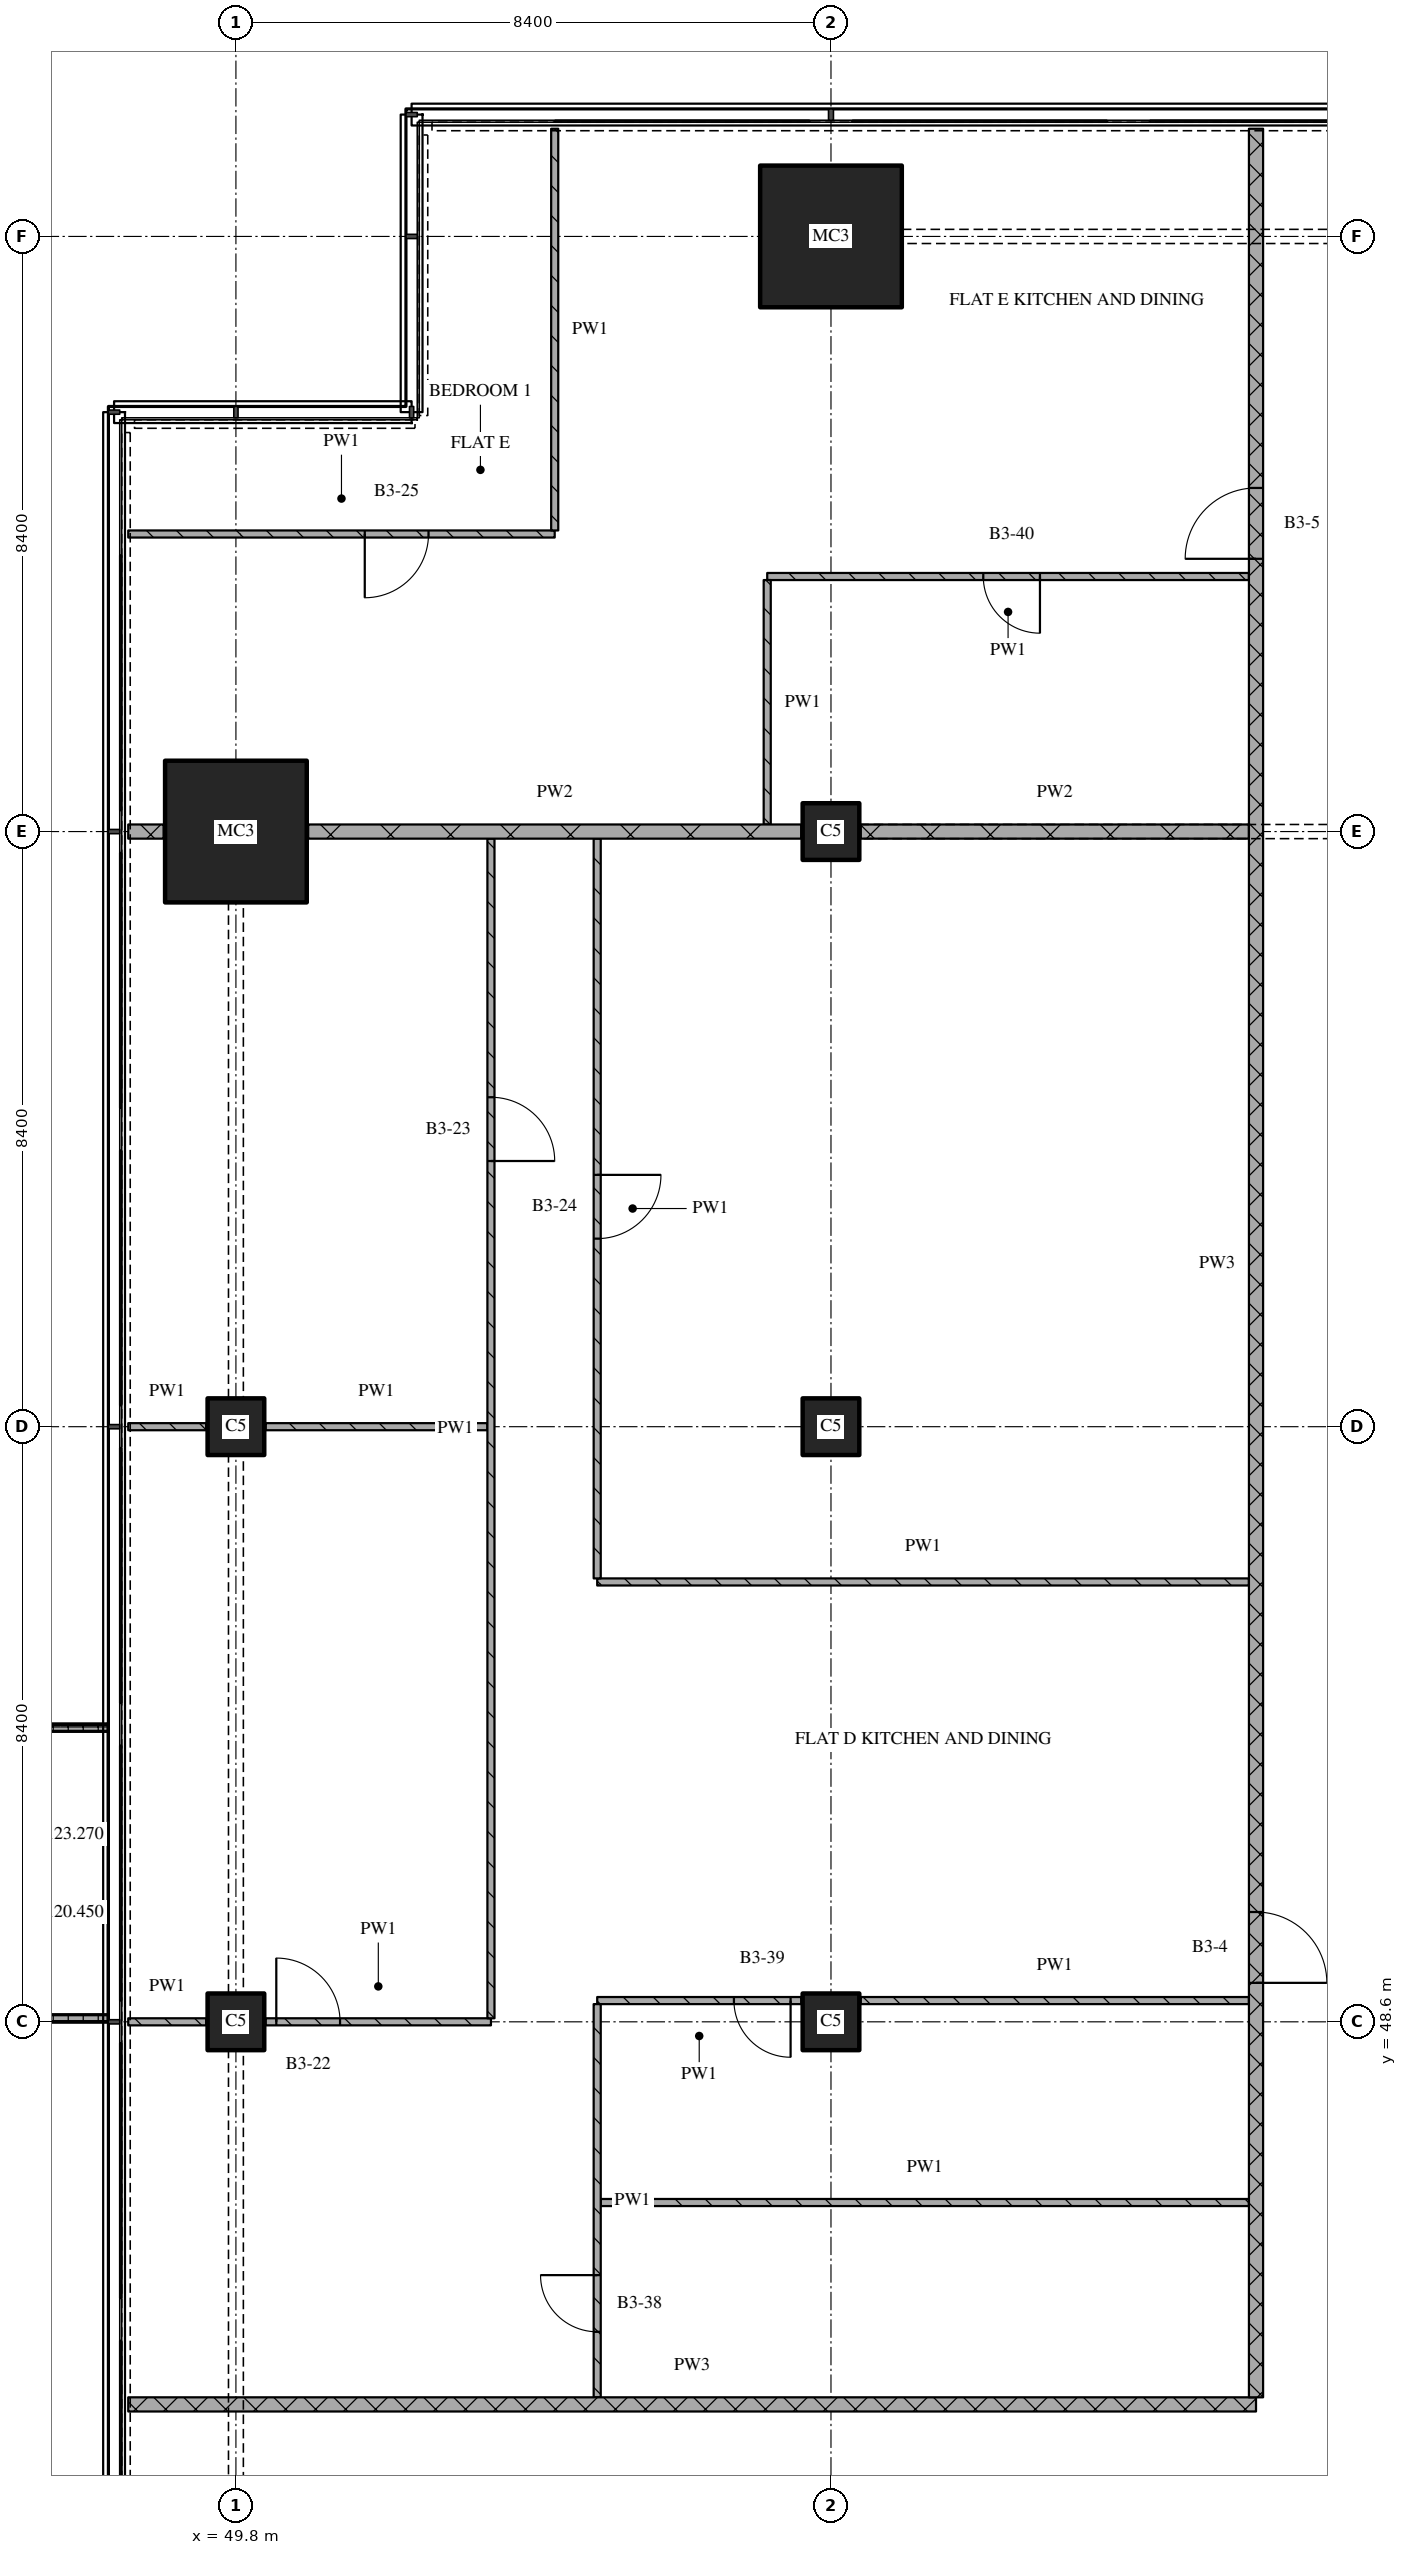
"""IFC4 building model, lengths in metres.
Left out: names, types, materials, properties, quantities, classifications, styles, units other than length and angle.
Written with IfcOpenShell. Run it as: python <this file> out.ifc"""

import sys

from ifc_helpers import new_model, si_unit, direction, frame, frame_2d, origin, origin_2d, place, context, subcontext, project, spatial, polyline, rectangle, outline, extrude, element, fill, save


model = new_model("IFC4")
c1 = context("Model", 3, precision=1e-05, world=origin(), true_north=direction((0.0, 1.0)))
c2 = subcontext(c1, "Body", "Model", "MODEL_VIEW")
j1 = project(units=[si_unit("LENGTHUNIT", "METRE"), si_unit("PLANEANGLEUNIT", "RADIAN")], contexts=[c1])
p1 = place(None, origin())
s1 = spatial("IfcSite", under=j1, at=p1, CompositionType="ELEMENT")
p2 = place(p1, origin())
s2 = spatial("IfcBuilding", under=s1, at=p2, CompositionType="ELEMENT")
p3 = place(p2, frame((0.0, 0.0, 120.45)))
s3 = spatial("IfcBuildingStorey", under=s2, at=p3, CompositionType="ELEMENT", Elevation=120.45)
for number, where, z_axis, x_axis in (
    (1, (49.8, 48.6, 0.0), (0.0, 0.0, 1.0), (1.0, 0.0, 0.0)),
    (2, (49.8, 57.0, 0.0), (0.0, 0.0, 1.0), (1.0, 0.0, 0.0)),
):
    element("IfcColumn", number, at=place(p3, frame(where, z_axis=z_axis, x_axis=x_axis)), inside=s3, PredefinedType="COLUMN", context=c2, shape_type="SweptSolid", body=[
        extrude(rectangle(XDim=0.8, YDim=0.8, at=origin_2d()), origin(), (0.0, 0.0, 1.0), 3.6),
    ])
p4 = place(p3, frame((49.8, 65.4, 0.0), z_axis=(0.0, 0.0, 1.0), x_axis=(1.0, 0.0, 0.0)))
e3 = element("IfcColumn", 3, at=p4, inside=s3, PredefinedType="COLUMN", context=c2, shape_type="SweptSolid", body=[
    extrude(rectangle(XDim=2.0, YDim=2.0, at=origin_2d()), origin(), (0.0, 0.0, 1.0), 3.6),
])
for number, where, z_axis, x_axis in (
    (4, (58.2, 48.6, 0.0), (0.0, 0.0, 1.0), (1.0, 0.0, 0.0)),
    (5, (58.2, 57.0, 0.0), (0.0, 0.0, 1.0), (1.0, 0.0, 0.0)),
    (6, (58.2, 65.4, 0.0), (0.0, 0.0, 1.0), (1.0, 0.0, 0.0)),
):
    element("IfcColumn", number, at=place(p3, frame(where, z_axis=z_axis, x_axis=x_axis)), inside=s3, PredefinedType="COLUMN", context=c2, shape_type="SweptSolid", body=[
        extrude(rectangle(XDim=0.8, YDim=0.8, at=origin_2d()), origin(), (0.0, 0.0, 1.0), 3.6),
    ])
p5 = place(p3, frame((58.2, 73.8, 0.0), z_axis=(0.0, 0.0, 1.0), x_axis=(1.0, 0.0, 0.0)))
e7 = element("IfcColumn", 7, at=p5, inside=s3, PredefinedType="COLUMN", context=c2, shape_type="SweptSolid", body=[
    extrude(rectangle(XDim=2.0, YDim=2.0, at=origin_2d()), origin(), (0.0, 0.0, 1.0), 3.6),
])
p6 = place(p3, origin())
e8 = element("IfcWall", 8, at=p6, inside=s3, PredefinedType="SOLIDWALL", context=c2, shape_type="SweptSolid", body=[
    extrude(outline(polyline([(48.0, 52.8), (48.0, 52.7), (46.367, 52.7), (46.367, 48.7), (48.0, 48.7), (48.0, 48.6), (46.267, 48.6), (46.267, 52.8), (48.0, 52.8)])), origin(), (0.0, 0.0, 1.0), 1.0),
])
p7 = place(p3, frame((48.28, 43.2, 0.0), z_axis=(0.0, 0.0, 1.0), x_axis=(1.0, 0.0, 0.0)))
e9 = element("IfcWall", 9, at=p7, inside=s3, PredefinedType="PARTITIONING", context=c2, shape_type="SweptSolid", body=[
    extrude(rectangle(XDim=15.92, YDim=0.2, at=frame_2d((7.96, 0.0))), origin(), (0.0, 0.0, 1.0), 3.32),
])
p8 = place(p3, frame((54.95, 46.05, 0.0), z_axis=(0.0, 0.0, 1.0), x_axis=(1.0, 0.0, 0.0)))
e10 = element("IfcWall", 10, at=p8, inside=s3, PredefinedType="PARTITIONING", context=c2, shape_type="SweptSolid", body=[
    extrude(rectangle(XDim=9.15, YDim=0.1, at=frame_2d((4.575, 0.0))), origin(), (0.0, 0.0, 1.0), 3.32),
])
p9 = place(p3, frame((48.28, 48.6, 0.0), z_axis=(0.0, 0.0, 1.0), x_axis=(1.0, 0.0, 0.0)))
e11 = element("IfcWall", 11, at=p9, inside=s3, PredefinedType="PARTITIONING", context=c2, shape_type="SweptSolid", body=[
    extrude(rectangle(XDim=1.1, YDim=0.1, at=frame_2d((0.55, 0.0))), origin(), (0.0, 0.0, 1.0), 3.32),
])
p10 = place(p3, frame((50.22, 48.6, 0.0), z_axis=(0.0, 0.0, 1.0), x_axis=(1.0, 0.0, 0.0)))
e12 = element("IfcWall", 12, at=p10, inside=s3, PredefinedType="PARTITIONING", context=c2, shape_type="SweptSolid", body=[
    extrude(rectangle(XDim=3.18, YDim=0.1, at=frame_2d((1.59, 0.0))), origin(), (0.0, 0.0, 1.0), 3.32),
])
p11 = place(p10, frame((0.15, 0.0, 0.0)))
e13 = element("IfcOpeningElement", 13, at=p11, cuts=e12, PredefinedType="OPENING", context=c2, shape_type="SweptSolid", body=[
    extrude(rectangle(XDim=0.9, YDim=2.1, at=frame_2d((0.45, 1.05))), frame((0.0, 0.06, 0.0), z_axis=(0.0, -1.0, 0.0), x_axis=(1.0, 0.0, 0.0)), (0.0, 0.0, 1.0), 0.12),
])
p12 = place(p3, frame((57.78, 48.9, 0.0), z_axis=(0.0, 0.0, 1.0), x_axis=(-1.0, 0.0, 0.0)))
e14 = element("IfcWall", 14, at=p12, inside=s3, PredefinedType="PARTITIONING", context=c2, shape_type="SweptSolid", body=[
    extrude(rectangle(XDim=2.88, YDim=0.1, at=frame_2d((1.44, 0.0))), origin(), (0.0, 0.0, 1.0), 3.32),
])
p13 = place(p12, frame((0.15, 0.0, 0.0)))
e15 = element("IfcOpeningElement", 15, at=p13, cuts=e14, PredefinedType="OPENING", context=c2, shape_type="SweptSolid", body=[
    extrude(rectangle(XDim=0.8, YDim=2.1, at=frame_2d((0.4, 1.05))), frame((0.0, 0.06, 0.0), z_axis=(0.0, -1.0, 0.0), x_axis=(1.0, 0.0, 0.0)), (0.0, 0.0, 1.0), 0.12),
])
p14 = place(p3, frame((58.62, 48.9, 0.0), z_axis=(0.0, 0.0, 1.0), x_axis=(1.0, 0.0, 0.0)))
e16 = element("IfcWall", 16, at=p14, inside=s3, PredefinedType="PARTITIONING", context=c2, shape_type="SweptSolid", body=[
    extrude(rectangle(XDim=5.48, YDim=0.1, at=frame_2d((2.74, 0.0))), origin(), (0.0, 0.0, 1.0), 3.32),
])
p15 = place(p3, frame((54.9, 54.809, 0.0), z_axis=(0.0, 0.0, 1.0), x_axis=(1.0, 0.0, 0.0)))
e17 = element("IfcWall", 17, at=p15, inside=s3, PredefinedType="PARTITIONING", context=c2, shape_type="SweptSolid", body=[
    extrude(rectangle(XDim=9.2, YDim=0.1, at=frame_2d((4.6, 0.0))), origin(), (0.0, 0.0, 1.0), 3.32),
])
p16 = place(p3, frame((48.28, 57.0, 0.0), z_axis=(0.0, 0.0, 1.0), x_axis=(1.0, 0.0, 0.0)))
e18 = element("IfcWall", 18, at=p16, inside=s3, PredefinedType="PARTITIONING", context=c2, shape_type="SweptSolid", body=[
    extrude(rectangle(XDim=1.1, YDim=0.1, at=frame_2d((0.55, 0.0))), origin(), (0.0, 0.0, 1.0), 3.32),
])
p17 = place(p3, frame((50.22, 57.0, 0.0), z_axis=(0.0, 0.0, 1.0), x_axis=(1.0, 0.0, 0.0)))
e19 = element("IfcWall", 19, at=p17, inside=s3, PredefinedType="PARTITIONING", context=c2, shape_type="SweptSolid", body=[
    extrude(rectangle(XDim=3.13, YDim=0.1, at=frame_2d((1.565, 0.0))), origin(), (0.0, 0.0, 1.0), 3.32),
])
p18 = place(p3, frame((48.28, 65.4, 0.0), z_axis=(0.0, 0.0, 1.0), x_axis=(1.0, 0.0, 0.0)))
e20 = element("IfcWall", 20, at=p18, inside=s3, PredefinedType="PARTITIONING", context=c2, shape_type="SweptSolid", body=[
    extrude(rectangle(XDim=0.5, YDim=0.2, at=frame_2d((0.25, 0.0))), origin(), (0.0, 0.0, 1.0), 3.32),
])
p19 = place(p3, frame((50.82, 65.4, 0.0), z_axis=(0.0, 0.0, 1.0), x_axis=(1.0, 0.0, 0.0)))
e21 = element("IfcWall", 21, at=p19, inside=s3, PredefinedType="PARTITIONING", context=c2, shape_type="SweptSolid", body=[
    extrude(rectangle(XDim=6.96, YDim=0.2, at=frame_2d((3.48, 0.0))), origin(), (0.0, 0.0, 1.0), 3.32),
])
p20 = place(p3, frame((58.62, 65.4, 0.0), z_axis=(0.0, 0.0, 1.0), x_axis=(1.0, 0.0, 0.0)))
e22 = element("IfcWall", 22, at=p20, inside=s3, PredefinedType="PARTITIONING", context=c2, shape_type="SweptSolid", body=[
    extrude(rectangle(XDim=5.48, YDim=0.2, at=frame_2d((2.74, 0.0))), origin(), (0.0, 0.0, 1.0), 2.82),
])
p21 = place(p3, frame((64.1, 69.0, 0.0), z_axis=(0.0, 0.0, 1.0), x_axis=(-1.0, 0.0, 0.0)))
e23 = element("IfcWall", 23, at=p21, inside=s3, PredefinedType="PARTITIONING", context=c2, shape_type="SweptSolid", body=[
    extrude(rectangle(XDim=6.8, YDim=0.1, at=frame_2d((3.4, 0.0))), origin(), (0.0, 0.0, 1.0), 3.32),
])
p22 = place(p21, frame((2.95, 0.0, 0.0)))
e24 = element("IfcOpeningElement", 24, at=p22, cuts=e23, PredefinedType="OPENING", context=c2, shape_type="SweptSolid", body=[
    extrude(rectangle(XDim=0.8, YDim=2.1, at=frame_2d((0.4, 1.05))), frame((0.0, 0.06, 0.0), z_axis=(0.0, -1.0, 0.0), x_axis=(1.0, 0.0, 0.0)), (0.0, 0.0, 1.0), 0.12),
])
p23 = place(p3, frame((48.28, 69.6, 0.0), z_axis=(0.0, 0.0, 1.0), x_axis=(1.0, 0.0, 0.0)))
e25 = element("IfcWall", 25, at=p23, inside=s3, PredefinedType="PARTITIONING", context=c2, shape_type="SweptSolid", body=[
    extrude(rectangle(XDim=6.02, YDim=0.1, at=frame_2d((3.01, 0.0))), origin(), (0.0, 0.0, 1.0), 3.32),
])
p24 = place(p23, frame((3.339, 0.0, 0.0)))
e26 = element("IfcOpeningElement", 26, at=p24, cuts=e25, PredefinedType="OPENING", context=c2, shape_type="SweptSolid", body=[
    extrude(rectangle(XDim=0.9, YDim=2.1, at=frame_2d((0.45, 1.05))), frame((0.0, 0.06, 0.0), z_axis=(0.0, -1.0, 0.0), x_axis=(1.0, 0.0, 0.0)), (0.0, 0.0, 1.0), 0.12),
])
p25 = place(p3, frame((53.4, 48.65, 0.0), z_axis=(0.0, 0.0, 1.0), x_axis=(0.0, 1.0, 0.0)))
e27 = element("IfcWall", 27, at=p25, inside=s3, PredefinedType="PARTITIONING", context=c2, shape_type="SweptSolid", body=[
    extrude(rectangle(XDim=16.65, YDim=0.1, at=frame_2d((8.325, 0.0))), origin(), (0.0, 0.0, 1.0), 3.32),
])
p26 = place(p25, frame((12.1, 0.0, 0.0)))
e28 = element("IfcOpeningElement", 28, at=p26, cuts=e27, PredefinedType="OPENING", context=c2, shape_type="SweptSolid", body=[
    extrude(rectangle(XDim=0.9, YDim=2.1, at=frame_2d((0.45, 1.05))), frame((0.0, 0.06, 0.0), z_axis=(0.0, -1.0, 0.0), x_axis=(1.0, 0.0, 0.0)), (0.0, 0.0, 1.0), 0.12),
])
p27 = place(p3, frame((54.3, 75.32, 0.0), z_axis=(0.0, 0.0, 1.0), x_axis=(0.0, -1.0, 0.0)))
e29 = element("IfcWall", 29, at=p27, inside=s3, PredefinedType="PARTITIONING", context=c2, shape_type="SweptSolid", body=[
    extrude(rectangle(XDim=5.67, YDim=0.1, at=frame_2d((2.835, 0.0))), origin(), (0.0, 0.0, 1.0), 3.32),
])
p28 = place(p3, frame((54.9, 48.85, 0.0), z_axis=(0.0, 0.0, 1.0), x_axis=(0.0, -1.0, 0.0)))
e30 = element("IfcWall", 30, at=p28, inside=s3, PredefinedType="PARTITIONING", context=c2, shape_type="SweptSolid", body=[
    extrude(rectangle(XDim=5.55, YDim=0.1, at=frame_2d((2.775, 0.0))), origin(), (0.0, 0.0, 1.0), 3.32),
])
p29 = place(p28, frame((3.825, 0.0, 0.0)))
e31 = element("IfcOpeningElement", 31, at=p29, cuts=e30, PredefinedType="OPENING", context=c2, shape_type="SweptSolid", body=[
    extrude(rectangle(XDim=0.8, YDim=2.1, at=frame_2d((0.4, 1.05))), frame((0.0, 0.06, 0.0), z_axis=(0.0, -1.0, 0.0), x_axis=(1.0, 0.0, 0.0)), (0.0, 0.0, 1.0), 0.12),
])
p30 = place(p3, frame((54.9, 65.3, 0.0), z_axis=(0.0, 0.0, 1.0), x_axis=(0.0, -1.0, 0.0)))
e32 = element("IfcWall", 32, at=p30, inside=s3, PredefinedType="PARTITIONING", context=c2, shape_type="SweptSolid", body=[
    extrude(rectangle(XDim=10.441, YDim=0.1, at=frame_2d((5.221, 0.0))), origin(), (0.0, 0.0, 1.0), 3.32),
])
p31 = place(p30, frame((4.746, 0.0, 0.0)))
e33 = element("IfcOpeningElement", 33, at=p31, cuts=e32, PredefinedType="OPENING", context=c2, shape_type="SweptSolid", body=[
    extrude(rectangle(XDim=0.9, YDim=2.1, at=frame_2d((0.45, 1.05))), frame((0.0, 0.06, 0.0), z_axis=(0.0, -1.0, 0.0), x_axis=(1.0, 0.0, 0.0)), (0.0, 0.0, 1.0), 0.12),
])
p32 = place(p3, frame((57.3, 68.95, 0.0), z_axis=(0.0, 0.0, 1.0), x_axis=(0.0, -1.0, 0.0)))
e34 = element("IfcWall", 34, at=p32, inside=s3, PredefinedType="PARTITIONING", context=c2, shape_type="SweptSolid", body=[
    extrude(rectangle(XDim=3.45, YDim=0.1, at=frame_2d((1.725, 0.0))), origin(), (0.0, 0.0, 1.0), 3.32),
])
p33 = place(p3, frame((64.2, 43.3, 0.0), z_axis=(0.0, 0.0, 1.0), x_axis=(0.0, 1.0, 0.0)))
e35 = element("IfcWall", 35, at=p33, inside=s3, PredefinedType="PARTITIONING", context=c2, shape_type="SweptSolid", body=[
    extrude(rectangle(XDim=32.02, YDim=0.2, at=frame_2d((16.01, 0.0))), origin(), (0.0, 0.0, 1.0), 3.32),
])
p34 = place(p33, frame((5.85, 0.0, 0.0)))
e36 = element("IfcOpeningElement", 36, at=p34, cuts=e35, PredefinedType="OPENING", context=c2, shape_type="SweptSolid", body=[
    extrude(rectangle(XDim=1.0, YDim=2.1, at=frame_2d((0.5, 1.05))), frame((0.0, 0.11, 0.0), z_axis=(0.0, -1.0, 0.0), x_axis=(1.0, 0.0, 0.0)), (0.0, 0.0, 1.0), 0.22),
])
p35 = place(p33, frame((25.95, 0.0, 0.0)))
e37 = element("IfcOpeningElement", 37, at=p35, cuts=e35, PredefinedType="OPENING", context=c2, shape_type="SweptSolid", body=[
    extrude(rectangle(XDim=1.0, YDim=2.1, at=frame_2d((0.5, 1.05))), frame((0.0, 0.11, 0.0), z_axis=(0.0, -1.0, 0.0), x_axis=(1.0, 0.0, 0.0)), (0.0, 0.0, 1.0), 0.22),
])
p36 = place(p11, origin())
e38 = element("IfcDoor", 38, at=p36, inside=s3, OperationType="SINGLE_SWING_LEFT", PredefinedType="DOOR", context=c2, shape_type="SweptSolid", body=[
    extrude(rectangle(XDim=0.9, YDim=2.1, at=frame_2d((0.45, 1.05))), frame((0.0, 0.025, 0.0), z_axis=(0.0, -1.0, 0.0), x_axis=(1.0, 0.0, 0.0)), (0.0, 0.0, 1.0), 0.05),
])
fill(e13, e38)
p37 = place(p13, origin())
e39 = element("IfcDoor", 39, at=p37, inside=s3, OperationType="SINGLE_SWING_LEFT", PredefinedType="DOOR", context=c2, shape_type="SweptSolid", body=[
    extrude(rectangle(XDim=0.8, YDim=2.1, at=frame_2d((0.4, 1.05))), frame((0.0, 0.025, 0.0), z_axis=(0.0, -1.0, 0.0), x_axis=(1.0, 0.0, 0.0)), (0.0, 0.0, 1.0), 0.05),
])
fill(e15, e39)
p38 = place(p22, origin())
e40 = element("IfcDoor", 40, at=p38, inside=s3, OperationType="SINGLE_SWING_LEFT", PredefinedType="DOOR", context=c2, shape_type="SweptSolid", body=[
    extrude(rectangle(XDim=0.8, YDim=2.1, at=frame_2d((0.4, 1.05))), frame((0.0, 0.025, 0.0), z_axis=(0.0, -1.0, 0.0), x_axis=(1.0, 0.0, 0.0)), (0.0, 0.0, 1.0), 0.05),
])
fill(e24, e40)
p39 = place(p24, origin())
e41 = element("IfcDoor", 41, at=p39, inside=s3, OperationType="SINGLE_SWING_RIGHT", PredefinedType="DOOR", context=c2, shape_type="SweptSolid", body=[
    extrude(rectangle(XDim=0.9, YDim=2.1, at=frame_2d((0.45, 1.05))), frame((0.0, 0.025, 0.0), z_axis=(0.0, -1.0, 0.0), x_axis=(1.0, 0.0, 0.0)), (0.0, 0.0, 1.0), 0.05),
])
fill(e26, e41)
p40 = place(p26, origin())
e42 = element("IfcDoor", 42, at=p40, inside=s3, OperationType="SINGLE_SWING_RIGHT", PredefinedType="DOOR", context=c2, shape_type="SweptSolid", body=[
    extrude(rectangle(XDim=0.9, YDim=2.1, at=frame_2d((0.45, 1.05))), frame((0.0, 0.025, 0.0), z_axis=(0.0, -1.0, 0.0), x_axis=(1.0, 0.0, 0.0)), (0.0, 0.0, 1.0), 0.05),
])
fill(e28, e42)
p41 = place(p29, origin())
e43 = element("IfcDoor", 43, at=p41, inside=s3, OperationType="SINGLE_SWING_RIGHT", PredefinedType="DOOR", context=c2, shape_type="SweptSolid", body=[
    extrude(rectangle(XDim=0.8, YDim=2.1, at=frame_2d((0.4, 1.05))), frame((0.0, 0.025, 0.0), z_axis=(0.0, -1.0, 0.0), x_axis=(1.0, 0.0, 0.0)), (0.0, 0.0, 1.0), 0.05),
])
fill(e31, e43)
p42 = place(p31, origin())
e44 = element("IfcDoor", 44, at=p42, inside=s3, OperationType="SINGLE_SWING_LEFT", PredefinedType="DOOR", context=c2, shape_type="SweptSolid", body=[
    extrude(rectangle(XDim=0.9, YDim=2.1, at=frame_2d((0.45, 1.05))), frame((0.0, 0.025, 0.0), z_axis=(0.0, -1.0, 0.0), x_axis=(1.0, 0.0, 0.0)), (0.0, 0.0, 1.0), 0.05),
])
fill(e33, e44)
p43 = place(p34, origin())
e45 = element("IfcDoor", 45, at=p43, inside=s3, OperationType="SINGLE_SWING_RIGHT", PredefinedType="DOOR", context=c2, shape_type="SweptSolid", body=[
    extrude(rectangle(XDim=1.0, YDim=2.1, at=frame_2d((0.5, 1.05))), frame((0.0, 0.025, 0.0), z_axis=(0.0, -1.0, 0.0), x_axis=(1.0, 0.0, 0.0)), (0.0, 0.0, 1.0), 0.05),
])
fill(e36, e45)
p44 = place(p35, origin())
e46 = element("IfcDoor", 46, at=p44, inside=s3, OperationType="SINGLE_SWING_LEFT", PredefinedType="DOOR", context=c2, shape_type="SweptSolid", body=[
    extrude(rectangle(XDim=1.0, YDim=2.1, at=frame_2d((0.5, 1.05))), frame((0.0, 0.025, 0.0), z_axis=(0.0, -1.0, 0.0), x_axis=(1.0, 0.0, 0.0)), (0.0, 0.0, 1.0), 0.05),
])
fill(e37, e46)
save(model, sys.argv[1])
